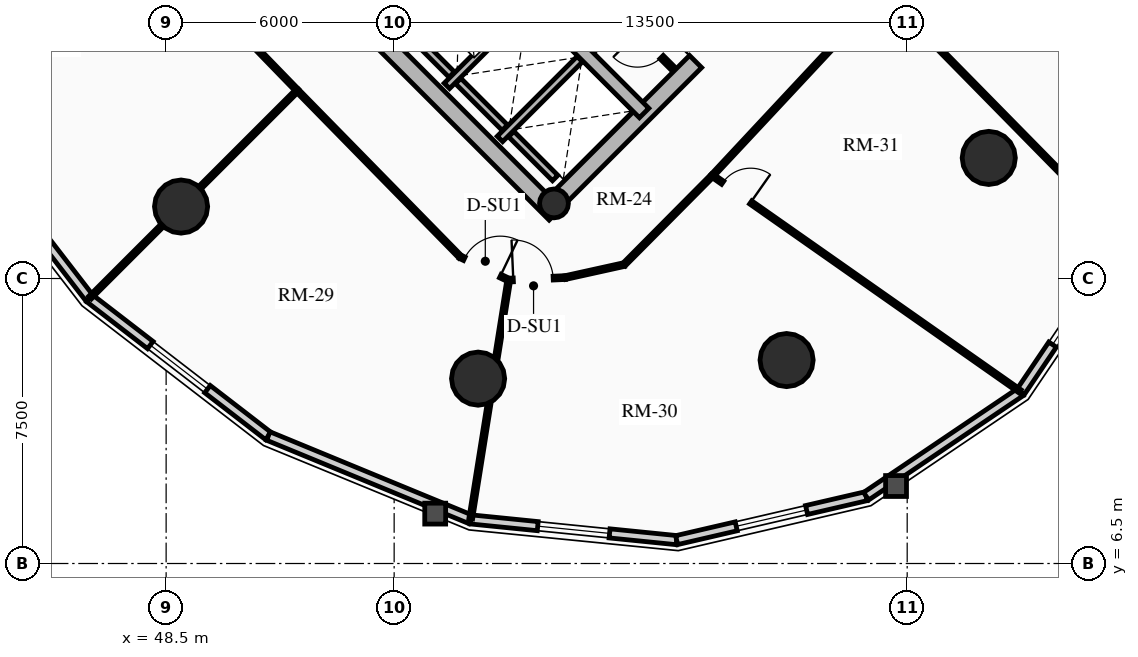
"""IFC4 building model, lengths in metres.
Left out: names, types, materials, properties, quantities, classifications, styles, units other than length and angle.
Written with IfcOpenShell. Run it as: python <this file> out.ifc"""

import sys

from ifc_helpers import new_model, si_unit, direction, frame, frame_2d, origin, origin_2d, place, context, subcontext, project, spatial, rectangle, circle, hollow_circle, extrude, source, transform, mapped, element, fill, save


model = new_model("IFC4")
c1 = context("Model", 3, precision=1e-05, world=origin(), true_north=direction((0.0, 1.0)))
c2 = subcontext(c1, "Body", "Model", "MODEL_VIEW")
j1 = project(units=[si_unit("LENGTHUNIT", "METRE"), si_unit("PLANEANGLEUNIT", "RADIAN")], contexts=[c1])
p1 = place(None, origin())
s1 = spatial("IfcSite", under=j1, at=p1, CompositionType="ELEMENT")
p2 = place(p1, origin())
s2 = spatial("IfcBuilding", under=s1, at=p2, CompositionType="ELEMENT")
p3 = place(p2, frame((0.0, 0.0, 99.25)))
s3 = spatial("IfcBuildingStorey", under=s2, at=p3, CompositionType="ELEMENT", Elevation=99.25)
p4 = place(p3, frame((58.737, 15.697, 0.0), z_axis=(0.0, 0.0, 1.0), x_axis=(-0.707106781187, 0.707106781187, 0.0)))
e1 = element("IfcWall", 1, at=p4, inside=s3, PredefinedType="SHEAR", context=c2, shape_type="SweptSolid", body=[
    extrude(rectangle(XDim=14.2, YDim=0.45, at=frame_2d((7.1, 0.0))), origin(), (0.0, 0.0, 1.0), 2.91),
])
p5 = place(p3, frame((58.578, 15.856, 0.0), z_axis=(0.0, 0.0, 1.0), x_axis=(0.707106781187, 0.707106781187, 0.0)))
e2 = element("IfcWall", 2, at=p5, inside=s3, PredefinedType="SHEAR", context=c2, shape_type="SweptSolid", body=[
    extrude(rectangle(XDim=10.7, YDim=0.45, at=frame_2d((5.35, 0.0))), origin(), (0.0, 0.0, 1.0), 2.91),
])
m1 = source(origin(), c2, "Body", "SweptSolid", [
    extrude(rectangle(XDim=1.5, YDim=2.02, at=frame_2d((0.75, 1.01))), frame((0.0, 0.235, 0.0), z_axis=(0.0, -1.0, 0.0), x_axis=(1.0, 0.0, 0.0)), (0.0, 0.0, 1.0), 0.47),
])
p6 = place(p5, frame((5.45, 0.0, 0.0)))
e3 = element("IfcOpeningElement", 3, at=p6, cuts=e2, PredefinedType="OPENING", context=c2, shape_type="MappedRepresentation", body=[
    mapped(m1, transform((0.0, 0.0, 0.0), x_axis=(1.0, 0.0, 0.0), y_axis=(0.0, 1.0, 0.0), z_axis=(0.0, 0.0, 1.0), scale=1.0)),
])
p7 = place(p3, frame((61.078, 18.355, 0.0), z_axis=(0.0, 0.0, 1.0), x_axis=(-0.707106781187, 0.707106781187, 0.0)))
e4 = element("IfcWall", 4, at=p7, inside=s3, PredefinedType="SHEAR", context=c2, shape_type="SweptSolid", body=[
    extrude(rectangle(XDim=13.75, YDim=0.35, at=frame_2d((6.875, 0.0))), origin(), (0.0, 0.0, 1.0), 2.91),
])
m2 = source(origin(), c2, "Body", "SweptSolid", [
    extrude(rectangle(XDim=1.1, YDim=2.015, at=frame_2d((0.55, 1.007))), frame((0.0, 0.185, 0.0), z_axis=(0.0, -1.0, 0.0), x_axis=(1.0, 0.0, 0.0)), (0.0, 0.0, 1.0), 0.37),
])
p8 = place(p7, frame((4.875, 0.0, 0.0)))
e5 = element("IfcOpeningElement", 5, at=p8, cuts=e4, PredefinedType="OPENING", context=c2, shape_type="MappedRepresentation", body=[
    mapped(m2, transform((0.0, 0.0, 0.0), x_axis=(1.0, 0.0, 0.0), y_axis=(0.0, 1.0, 0.0), z_axis=(0.0, 0.0, 1.0), scale=1.0)),
])
m3 = source(origin(), c2, "Body", "SweptSolid", [
    extrude(rectangle(XDim=1.15, YDim=2.02, at=frame_2d((0.575, 1.01))), frame((0.0, 0.185, 0.0), z_axis=(0.0, -1.0, 0.0), x_axis=(1.0, 0.0, 0.0)), (0.0, 0.0, 1.0), 0.37),
])
p9 = place(p7, frame((7.295, 0.0, 0.0)))
e6 = element("IfcOpeningElement", 6, at=p9, cuts=e4, PredefinedType="OPENING", context=c2, shape_type="MappedRepresentation", body=[
    mapped(m3, transform((0.0, 0.0, 0.0), x_axis=(1.0, 0.0, 0.0), y_axis=(0.0, 1.0, 0.0), z_axis=(0.0, 0.0, 1.0), scale=1.0)),
])
p10 = place(p3, frame((58.706, 15.976, 0.0), z_axis=(0.0, 0.0, 1.0), x_axis=(0.707106781187, 0.707106781187, 0.0)))
e7 = element("IfcColumn", 7, at=p10, inside=s3, PredefinedType="COLUMN", context=c2, shape_type="SweptSolid", body=[
    extrude(hollow_circle(Radius=0.38, WallThickness=0.032, at=origin_2d()), origin(), (0.0, 0.0, 1.0), 2.91),
])
for number, where, z_axis, x_axis in (
    (8, (48.893, 15.893, 0.0), (0.0, 0.0, 1.0), (1.0, 0.0, 0.0)),
    (9, (56.709, 11.365, 0.0), (0.0, 0.0, 1.0), (1.0, 0.0, 0.0)),
    (10, (64.827, 11.854, 0.0), (0.0, 0.0, 1.0), (1.0, 0.0, 0.0)),
    (11, (70.146, 17.173, 0.0), (0.0, 0.0, 1.0), (1.0, 0.0, 0.0)),
):
    element("IfcColumn", number, at=place(p3, frame(where, z_axis=z_axis, x_axis=x_axis)), inside=s3, PredefinedType="USERDEFINED", context=c2, shape_type="SweptSolid", body=[
        extrude(circle(Radius=0.7, at=origin_2d()), origin(), (0.0, 0.0, 1.0), 2.91),
    ])
p11 = place(p3, frame((46.483, 13.483, 0.0), z_axis=(0.0, 0.0, 1.0), x_axis=(-0.61054437102, 0.791982052206, 0.0)))
e12 = element("IfcWall", 12, at=p11, inside=s3, PredefinedType="SOLIDWALL", context=c2, shape_type="SweptSolid", body=[
    extrude(rectangle(XDim=5.942, YDim=0.24, at=frame_2d((2.971, 0.0))), origin(), (0.0, 0.0, 1.0), 2.179),
])
p12 = place(p3, frame((51.189, 9.855, 0.0), z_axis=(0.0, 0.0, 1.0), x_axis=(-0.791982052206, 0.61054437102, 0.0)))
e13 = element("IfcWall", 13, at=p12, inside=s3, PredefinedType="SOLIDWALL", context=c2, shape_type="SweptSolid", body=[
    extrude(rectangle(XDim=5.942, YDim=0.24, at=frame_2d((2.971, 0.0))), origin(), (0.0, 0.0, 1.0), 2.179),
])
m4 = source(origin(), c2, "Body", "SweptSolid", [
    extrude(rectangle(XDim=1.9, YDim=1.35, at=frame_2d((0.95, 0.675))), frame((0.0, 0.13, 0.0), z_axis=(0.0, -1.0, 0.0), x_axis=(1.0, 0.0, 0.0)), (0.0, 0.0, 1.0), 0.26),
])
p13 = place(p12, frame((2.021, 0.0, 0.65)))
e14 = element("IfcOpeningElement", 14, at=p13, cuts=e13, PredefinedType="OPENING", context=c2, shape_type="MappedRepresentation", body=[
    mapped(m4, transform((0.0, 0.0, 0.0), x_axis=(1.0, 0.0, 0.0), y_axis=(0.0, 1.0, 0.0), z_axis=(0.0, 0.0, 1.0), scale=1.0)),
])
p14 = place(p3, frame((56.513, 7.661, 0.0), z_axis=(0.0, 0.0, 1.0), x_axis=(-0.924563909604, 0.381027003055, 0.0)))
e15 = element("IfcWall", 15, at=p14, inside=s3, PredefinedType="SOLIDWALL", context=c2, shape_type="SweptSolid", body=[
    extrude(rectangle(XDim=5.758, YDim=0.24, at=frame_2d((2.879, 0.0))), origin(), (0.0, 0.0, 1.0), 2.179),
])
p15 = place(p3, frame((61.933, 7.115, 0.0), z_axis=(0.0, 0.0, 1.0), x_axis=(-0.994971754311, 0.10015591906, 0.0)))
e16 = element("IfcWall", 16, at=p15, inside=s3, PredefinedType="SOLIDWALL", context=c2, shape_type="SweptSolid", body=[
    extrude(rectangle(XDim=5.448, YDim=0.24, at=frame_2d((2.724, 0.0))), origin(), (0.0, 0.0, 1.0), 2.179),
])
p16 = place(p15, frame((1.774, 0.0, 0.65)))
e17 = element("IfcOpeningElement", 17, at=p16, cuts=e16, PredefinedType="OPENING", context=c2, shape_type="MappedRepresentation", body=[
    mapped(m4, transform((0.0, 0.0, 0.0), x_axis=(1.0, 0.0, 0.0), y_axis=(0.0, 1.0, 0.0), z_axis=(0.0, 0.0, 1.0), scale=1.0)),
])
p17 = place(p3, frame((66.92, 8.271, 0.0), z_axis=(0.0, 0.0, 1.0), x_axis=(-0.974165631126, -0.225834725257, 0.0)))
e18 = element("IfcWall", 18, at=p17, inside=s3, PredefinedType="SOLIDWALL", context=c2, shape_type="SweptSolid", body=[
    extrude(rectangle(XDim=5.119, YDim=0.24, at=frame_2d((2.56, 0.0))), origin(), (0.0, 0.0, 1.0), 2.179),
])
p18 = place(p17, frame((1.609, 0.0, 0.65)))
e19 = element("IfcOpeningElement", 19, at=p18, cuts=e18, PredefinedType="OPENING", context=c2, shape_type="MappedRepresentation", body=[
    mapped(m4, transform((0.0, 0.0, 0.0), x_axis=(1.0, 0.0, 0.0), y_axis=(0.0, 1.0, 0.0), z_axis=(0.0, 0.0, 1.0), scale=1.0)),
])
p19 = place(p3, frame((70.985, 11.015, 0.0), z_axis=(0.0, 0.0, 1.0), x_axis=(-0.828781148131, -0.559572880421, 0.0)))
e20 = element("IfcWall", 20, at=p19, inside=s3, PredefinedType="SOLIDWALL", context=c2, shape_type="SweptSolid", body=[
    extrude(rectangle(XDim=4.905, YDim=0.24, at=frame_2d((2.452, 0.0))), origin(), (0.0, 0.0, 1.0), 2.179),
])
p20 = place(p3, frame((73.729, 15.08, 0.0), z_axis=(0.0, 0.0, 1.0), x_axis=(-0.559572880421, -0.828781148131, 0.0)))
e21 = element("IfcWall", 21, at=p20, inside=s3, PredefinedType="SOLIDWALL", context=c2, shape_type="SweptSolid", body=[
    extrude(rectangle(XDim=4.905, YDim=0.24, at=frame_2d((2.452, 0.0))), origin(), (0.0, 0.0, 1.0), 2.179),
])
p21 = place(p20, frame((1.502, 0.0, 0.65)))
e22 = element("IfcOpeningElement", 22, at=p21, cuts=e21, PredefinedType="OPENING", context=c2, shape_type="MappedRepresentation", body=[
    mapped(m4, transform((0.0, 0.0, 0.0), x_axis=(1.0, 0.0, 0.0), y_axis=(0.0, 1.0, 0.0), z_axis=(0.0, 0.0, 1.0), scale=1.0)),
])
p22 = place(p3, frame((55.888, 19.069, 0.0), z_axis=(0.0, 0.0, 1.0), x_axis=(0.707106781187, 0.707106781187, 0.0)))
e23 = element("IfcWall", 23, at=p22, inside=s3, PredefinedType="SHEAR", context=c2, shape_type="SweptSolid", body=[
    extrude(rectangle(XDim=2.97, YDim=0.2, at=frame_2d((1.485, 0.0))), origin(), (0.0, 0.0, 1.0), 2.91),
])
p23 = place(p3, frame((56.015, 19.366, 0.0), z_axis=(0.0, 0.0, 1.0), x_axis=(-0.707106781187, 0.707106781187, 0.0)))
e24 = element("IfcWall", 24, at=p23, inside=s3, PredefinedType="SHEAR", context=c2, shape_type="SweptSolid", body=[
    extrude(rectangle(XDim=2.44, YDim=0.2, at=frame_2d((1.22, 0.0))), origin(), (0.0, 0.0, 1.0), 2.91),
])
p24 = place(p3, frame((57.284, 17.673, 0.0), z_axis=(0.0, 0.0, 1.0), x_axis=(0.707147878904, 0.70706568108, 0.0)))
e25 = element("IfcWall", 25, at=p24, inside=s3, PredefinedType="SHEAR", context=c2, shape_type="SweptSolid", body=[
    extrude(rectangle(XDim=2.97, YDim=0.2, at=frame_2d((1.485, 0.0))), origin(), (0.0, 0.0, 1.0), 2.91),
])
p25 = place(p3, frame((57.412, 17.97, 0.0), z_axis=(0.0, 0.0, 1.0), x_axis=(-0.707106781187, 0.707106781187, 0.0)))
e26 = element("IfcWall", 26, at=p25, inside=s3, PredefinedType="SHEAR", context=c2, shape_type="SweptSolid", body=[
    extrude(rectangle(XDim=1.735, YDim=0.2, at=frame_2d((0.867, 0.0))), origin(), (0.0, 0.0, 1.0), 2.91),
])
p26 = place(p3, frame((58.737, 16.644, 0.0), z_axis=(0.0, 0.0, 1.0), x_axis=(-0.707032117043, 0.707181437447, 0.0)))
e27 = element("IfcWall", 27, at=p26, inside=s3, PredefinedType="SHEAR", context=c2, shape_type="SweptSolid", body=[
    extrude(rectangle(XDim=1.635, YDim=0.2, at=frame_2d((0.817, 0.0))), origin(), (0.0, 0.0, 1.0), 2.91),
])
p27 = place(p3, frame((61.835, 19.529, 0.0), z_axis=(0.0, 0.0, 1.0), x_axis=(-0.707174592913, 0.707038962956, 0.0)))
e28 = element("IfcWall", 28, at=p27, inside=s3, PredefinedType="PARTITIONING", context=c2, shape_type="SweptSolid", body=[
    extrude(rectangle(XDim=1.8, YDim=0.125, at=frame_2d((0.9, 0.0))), origin(), (0.0, 0.0, 1.0), 2.655),
])
m5 = source(origin(), c2, "Body", "SweptSolid", [
    extrude(rectangle(XDim=0.9, YDim=2.005, at=frame_2d((0.45, 1.002))), frame((0.0, 0.073, 0.0), z_axis=(0.0, -1.0, 0.0), x_axis=(1.0, 0.0, 0.0)), (0.0, 0.0, 1.0), 0.145),
])
p28 = place(p27, frame((0.42, 0.0, 0.0)))
e29 = element("IfcOpeningElement", 29, at=p28, cuts=e28, PredefinedType="OPENING", context=c2, shape_type="MappedRepresentation", body=[
    mapped(m5, transform((0.0, 0.0, 0.0), x_axis=(1.0, 0.0, 0.0), y_axis=(0.0, 1.0, 0.0), z_axis=(0.0, 0.0, 1.0), scale=1.0)),
])
p29 = place(p3, frame((47.763, 23.265, 0.0), z_axis=(0.0, 0.0, 1.0), x_axis=(0.696243493404, -0.717805682544, 0.0)))
e30 = element("IfcWall", 30, at=p29, inside=s3, PredefinedType="MOVABLE", context=c2, shape_type="SweptSolid", body=[
    extrude(rectangle(XDim=6.012, YDim=0.1, at=frame_2d((3.006, 0.0))), origin(), (0.0, 0.0, 1.0), 2.655),
])
m6 = source(origin(), c2, "Body", "SweptSolid", [
    extrude(rectangle(XDim=1.05, YDim=2.015, at=frame_2d((0.525, 1.007))), frame((0.0, 0.06, 0.0), z_axis=(0.0, -1.0, 0.0), x_axis=(1.0, 0.0, 0.0)), (0.0, 0.0, 1.0), 0.12),
])
p30 = place(p29, frame((2.481, 0.0, 0.0)))
e31 = element("IfcOpeningElement", 31, at=p30, cuts=e30, PredefinedType="OPENING", context=c2, shape_type="MappedRepresentation", body=[
    mapped(m6, transform((0.0, 0.0, 0.0), x_axis=(1.0, 0.0, 0.0), y_axis=(0.0, 1.0, 0.0), z_axis=(0.0, 0.0, 1.0), scale=1.0)),
])
p31 = place(p3, frame((51.949, 18.949, 0.0), z_axis=(0.0, 0.0, 1.0), x_axis=(0.699840807936, -0.714298847506, 0.0)))
e32 = element("IfcWall", 32, at=p31, inside=s3, PredefinedType="MOVABLE", context=c2, shape_type="SweptSolid", body=[
    extrude(rectangle(XDim=6.13, YDim=0.1, at=frame_2d((3.065, 0.0))), origin(), (0.0, 0.0, 1.0), 2.225),
])
p32 = place(p3, frame((56.239, 14.571, 0.0), z_axis=(0.0, 0.0, 1.0), x_axis=(0.901549955153, -0.432675026278, 0.0)))
e33 = element("IfcWall", 33, at=p32, inside=s3, PredefinedType="MOVABLE", context=c2, shape_type="SweptSolid", body=[
    extrude(rectangle(XDim=1.416, YDim=0.1, at=frame_2d((0.708, 0.0))), origin(), (0.0, 0.0, 1.0), 2.225),
])
p33 = place(p32, frame((0.12, 0.0, 0.0)))
e34 = element("IfcOpeningElement", 34, at=p33, cuts=e33, PredefinedType="OPENING", context=c2, shape_type="MappedRepresentation", body=[
    mapped(m6, transform((0.0, 0.0, 0.0), x_axis=(1.0, 0.0, 0.0), y_axis=(0.0, 1.0, 0.0), z_axis=(0.0, 0.0, 1.0), scale=1.0)),
])
p34 = place(p3, frame((57.516, 13.958, 0.0), z_axis=(0.0, 0.0, 1.0), x_axis=(0.999005711776, 0.044582371387, 0.0)))
e35 = element("IfcWall", 35, at=p34, inside=s3, PredefinedType="MOVABLE", context=c2, shape_type="SweptSolid", body=[
    extrude(rectangle(XDim=1.49, YDim=0.1, at=frame_2d((0.745, 0.0))), origin(), (0.0, 0.0, 1.0), 2.225),
])
p35 = place(p34, frame((0.12, 0.0, 0.0)))
e36 = element("IfcOpeningElement", 36, at=p35, cuts=e35, PredefinedType="OPENING", context=c2, shape_type="MappedRepresentation", body=[
    mapped(m6, transform((0.0, 0.0, 0.0), x_axis=(1.0, 0.0, 0.0), y_axis=(0.0, 1.0, 0.0), z_axis=(0.0, 0.0, 1.0), scale=1.0)),
])
p36 = place(p3, frame((59.004, 14.024, 0.0), z_axis=(0.0, 0.0, 1.0), x_axis=(0.976436847881, 0.215803341262, 0.0)))
e37 = element("IfcWall", 37, at=p36, inside=s3, PredefinedType="MOVABLE", context=c2, shape_type="SweptSolid", body=[
    extrude(rectangle(XDim=1.583, YDim=0.1, at=frame_2d((0.792, 0.0))), origin(), (0.0, 0.0, 1.0), 2.225),
])
p37 = place(p3, frame((60.549, 14.366, 0.0), z_axis=(0.0, 0.0, 1.0), x_axis=(0.704402344516, 0.709800913666, 0.0)))
e38 = element("IfcWall", 38, at=p37, inside=s3, PredefinedType="MOVABLE", context=c2, shape_type="SweptSolid", body=[
    extrude(rectangle(XDim=3.301, YDim=0.1, at=frame_2d((1.651, 0.0))), origin(), (0.0, 0.0, 1.0), 2.225),
])
p38 = place(p3, frame((62.875, 16.709, 0.0), z_axis=(0.0, 0.0, 1.0), x_axis=(0.682290572861, 0.731081099595, 0.0)))
e39 = element("IfcWall", 39, at=p38, inside=s3, PredefinedType="MOVABLE", context=c2, shape_type="SweptSolid", body=[
    extrude(rectangle(XDim=6.6, YDim=0.1, at=frame_2d((3.3, 0.0))), origin(), (0.0, 0.0, 1.0), 2.225),
])
p39 = place(p3, frame((51.949, 18.949, 0.0), z_axis=(0.0, 0.0, 1.0), x_axis=(-0.707106781187, -0.707106781187, 0.0)))
e40 = element("IfcWall", 40, at=p39, inside=s3, PredefinedType="MOVABLE", context=c2, shape_type="SweptSolid", body=[
    extrude(rectangle(XDim=7.711, YDim=0.1, at=frame_2d((3.855, 0.0))), origin(), (0.0, 0.0, 1.0), 2.179),
])
p40 = place(p3, frame((57.516, 13.958, 0.0), z_axis=(0.0, 0.0, 1.0), x_axis=(-0.157313405462, -0.987548729158, 0.0)))
e41 = element("IfcWall", 41, at=p40, inside=s3, PredefinedType="MOVABLE", context=c2, shape_type="SweptSolid", body=[
    extrude(rectangle(XDim=6.357, YDim=0.1, at=frame_2d((3.178, 0.0))), origin(), (0.0, 0.0, 1.0), 2.179),
])
p41 = place(p3, frame((67.378, 21.534, 0.0), z_axis=(0.0, 0.0, 1.0), x_axis=(0.700878918497, -0.713280268622, 0.0)))
e42 = element("IfcWall", 42, at=p41, inside=s3, PredefinedType="MOVABLE", context=c2, shape_type="SweptSolid", body=[
    extrude(rectangle(XDim=9.036, YDim=0.1, at=frame_2d((4.518, 0.0))), origin(), (0.0, 0.0, 1.0), 2.179),
])
p42 = place(p3, frame((62.875, 16.709, 0.0), z_axis=(0.0, 0.0, 1.0), x_axis=(0.818628370173, -0.574323594804, 0.0)))
e43 = element("IfcWall", 43, at=p42, inside=s3, PredefinedType="MOVABLE", context=c2, shape_type="SweptSolid", body=[
    extrude(rectangle(XDim=9.889, YDim=0.1, at=frame_2d((4.945, 0.0))), origin(), (0.0, 0.0, 1.0), 2.179),
])
m7 = source(origin(), c2, "Body", "SweptSolid", [
    extrude(rectangle(XDim=0.9, YDim=2.005, at=frame_2d((0.45, 1.002))), frame((0.0, 0.06, 0.0), z_axis=(0.0, -1.0, 0.0), x_axis=(1.0, 0.0, 0.0)), (0.0, 0.0, 1.0), 0.12),
])
p43 = place(p42, frame((0.33, 0.0, 0.0)))
e44 = element("IfcOpeningElement", 44, at=p43, cuts=e43, PredefinedType="OPENING", context=c2, shape_type="MappedRepresentation", body=[
    mapped(m7, transform((0.0, 0.0, 0.0), x_axis=(1.0, 0.0, 0.0), y_axis=(0.0, 1.0, 0.0), z_axis=(0.0, 0.0, 1.0), scale=1.0)),
])
m8 = source(origin(), c2, "Body", "SweptSolid", [
    extrude(rectangle(XDim=1.9, YDim=1.35, at=frame_2d((0.95, 0.675))), frame((0.0, 0.03, 0.0), z_axis=(0.0, -1.0, 0.0), x_axis=(1.0, 0.0, 0.0)), (0.0, 0.0, 1.0), 0.06),
])
p44 = place(p13, origin())
e45 = element("IfcWindow", 45, at=p44, inside=s3, PartitioningType="DOUBLE_PANEL_VERTICAL", PredefinedType="WINDOW", context=c2, shape_type="MappedRepresentation", body=[
    mapped(m8, transform((0.0, 0.0, 0.0), x_axis=(1.0, 0.0, 0.0), y_axis=(0.0, 1.0, 0.0), z_axis=(0.0, 0.0, 1.0), scale=1.0)),
])
fill(e14, e45)
p45 = place(p16, origin())
e46 = element("IfcWindow", 46, at=p45, inside=s3, PartitioningType="DOUBLE_PANEL_VERTICAL", PredefinedType="WINDOW", context=c2, shape_type="MappedRepresentation", body=[
    mapped(m8, transform((0.0, 0.0, 0.0), x_axis=(1.0, 0.0, 0.0), y_axis=(0.0, 1.0, 0.0), z_axis=(0.0, 0.0, 1.0), scale=1.0)),
])
fill(e17, e46)
p46 = place(p18, origin())
e47 = element("IfcWindow", 47, at=p46, inside=s3, PartitioningType="DOUBLE_PANEL_VERTICAL", PredefinedType="WINDOW", context=c2, shape_type="MappedRepresentation", body=[
    mapped(m8, transform((0.0, 0.0, 0.0), x_axis=(1.0, 0.0, 0.0), y_axis=(0.0, 1.0, 0.0), z_axis=(0.0, 0.0, 1.0), scale=1.0)),
])
fill(e19, e47)
p47 = place(p21, origin())
e48 = element("IfcWindow", 48, at=p47, inside=s3, PartitioningType="DOUBLE_PANEL_VERTICAL", PredefinedType="WINDOW", context=c2, shape_type="MappedRepresentation", body=[
    mapped(m8, transform((0.0, 0.0, 0.0), x_axis=(1.0, 0.0, 0.0), y_axis=(0.0, 1.0, 0.0), z_axis=(0.0, 0.0, 1.0), scale=1.0)),
])
fill(e22, e48)
m9 = source(origin(), c2, "Body", "SweptSolid", [
    extrude(rectangle(XDim=1.5, YDim=2.02, at=frame_2d((0.75, 1.01))), frame((0.0, 0.025, 0.0), z_axis=(0.0, -1.0, 0.0), x_axis=(1.0, 0.0, 0.0)), (0.0, 0.0, 1.0), 0.05),
])
p48 = place(p6, origin())
e49 = element("IfcDoor", 49, at=p48, inside=s3, OperationType="DOUBLE_DOOR_SINGLE_SWING", PredefinedType="DOOR", context=c2, shape_type="MappedRepresentation", body=[
    mapped(m9, transform((0.0, 0.0, 0.0), x_axis=(1.0, 0.0, 0.0), y_axis=(0.0, 1.0, 0.0), z_axis=(0.0, 0.0, 1.0), scale=1.0)),
])
fill(e3, e49)
m10 = source(origin(), c2, "Body", "SweptSolid", [
    extrude(rectangle(XDim=0.9, YDim=2.005, at=frame_2d((0.45, 1.002))), frame((0.0, 0.025, 0.0), z_axis=(0.0, -1.0, 0.0), x_axis=(1.0, 0.0, 0.0)), (0.0, 0.0, 1.0), 0.05),
])
p49 = place(p28, origin())
e50 = element("IfcDoor", 50, at=p49, inside=s3, OperationType="SINGLE_SWING_RIGHT", PredefinedType="DOOR", context=c2, shape_type="MappedRepresentation", body=[
    mapped(m10, transform((0.0, 0.0, 0.0), x_axis=(1.0, 0.0, 0.0), y_axis=(0.0, 1.0, 0.0), z_axis=(0.0, 0.0, 1.0), scale=1.0)),
])
fill(e29, e50)
m11 = source(origin(), c2, "Body", "SweptSolid", [
    extrude(rectangle(XDim=1.05, YDim=2.015, at=frame_2d((0.525, 1.007))), frame((0.0, 0.025, 0.0), z_axis=(0.0, -1.0, 0.0), x_axis=(1.0, 0.0, 0.0)), (0.0, 0.0, 1.0), 0.05),
])
p50 = place(p33, origin())
e51 = element("IfcDoor", 51, at=p50, inside=s3, OperationType="SINGLE_SWING_RIGHT", PredefinedType="DOOR", context=c2, shape_type="MappedRepresentation", body=[
    mapped(m11, transform((0.0, 0.0, 0.0), x_axis=(1.0, 0.0, 0.0), y_axis=(0.0, 1.0, 0.0), z_axis=(0.0, 0.0, 1.0), scale=1.0)),
])
fill(e34, e51)
p51 = place(p35, origin())
e52 = element("IfcDoor", 52, at=p51, inside=s3, OperationType="SINGLE_SWING_LEFT", PredefinedType="DOOR", context=c2, shape_type="MappedRepresentation", body=[
    mapped(m11, transform((0.0, 0.0, 0.0), x_axis=(1.0, 0.0, 0.0), y_axis=(0.0, 1.0, 0.0), z_axis=(0.0, 0.0, 1.0), scale=1.0)),
])
fill(e36, e52)
p52 = place(p43, origin())
e53 = element("IfcDoor", 53, at=p52, inside=s3, OperationType="SINGLE_SWING_RIGHT", PredefinedType="DOOR", context=c2, shape_type="MappedRepresentation", body=[
    mapped(m10, transform((0.0, 0.0, 0.0), x_axis=(1.0, 0.0, 0.0), y_axis=(0.0, 1.0, 0.0), z_axis=(0.0, 0.0, 1.0), scale=1.0)),
])
fill(e44, e53)
save(model, sys.argv[1])
